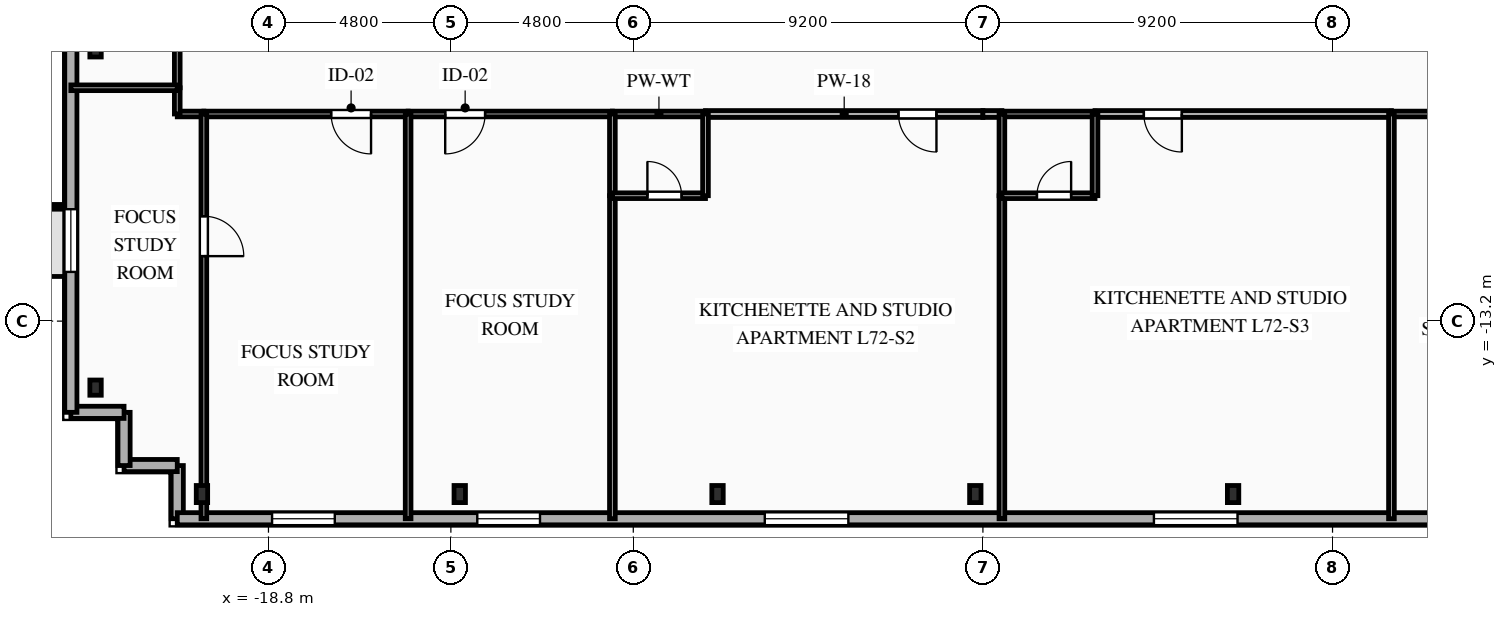
"""IFC4 building model, lengths in metres.
Left out: names, types, materials, properties, quantities, classifications, styles, units other than length and angle.
Written with IfcOpenShell. Run it as: python <this file> out.ifc"""

import sys

from ifc_helpers import new_model, si_unit, direction, frame, frame_2d, origin, origin_2d, place, context, subcontext, project, spatial, rectangle, i_section, extrude, element, fill, save


model = new_model("IFC4")
c1 = context("Model", 3, precision=1e-05, world=origin(), true_north=direction((0.0, 1.0)))
c2 = subcontext(c1, "Body", "Model", "MODEL_VIEW")
j1 = project(units=[si_unit("LENGTHUNIT", "METRE"), si_unit("PLANEANGLEUNIT", "RADIAN")], contexts=[c1])
p1 = place(None, origin())
s1 = spatial("IfcSite", under=j1, at=p1, CompositionType="ELEMENT")
p2 = place(p1, origin())
s2 = spatial("IfcBuilding", under=s1, at=p2, CompositionType="ELEMENT")
p3 = place(p2, frame((0.0, 0.0, 255.1)))
s3 = spatial("IfcBuildingStorey", under=s2, at=p3, CompositionType="ELEMENT", Elevation=255.1)
for number, where, z_axis, x_axis in (
    (1, (-20.55, -17.75, 0.0), (0.0, 0.0, 1.0), (1.0, 0.0, 0.0)),
    (2, (-13.767, -17.75, 0.0), (0.0, 0.0, 1.0), (1.0, 0.0, 0.0)),
    (3, (-6.983, -17.75, 0.0), (0.0, 0.0, 1.0), (1.0, 0.0, 0.0)),
    (4, (-0.2, -17.75, 0.0), (0.0, 0.0, 1.0), (1.0, 0.0, 0.0)),
    (5, (6.583, -17.75, 0.0), (0.0, 0.0, 1.0), (1.0, 0.0, 0.0)),
):
    element("IfcColumn", number, at=place(p3, frame(where, z_axis=z_axis, x_axis=x_axis)), inside=s3, PredefinedType="COLUMN", context=c2, shape_type="SweptSolid", body=[
        extrude(i_section(OverallWidth=0.3, OverallDepth=0.45, WebThickness=0.014, FlangeThickness=0.026, FilletRadius=0.027, at=origin_2d()), origin(), (0.0, 0.0, 1.0), 3.35),
    ])
for number, where, z_axis, x_axis in (
    (6, (-23.35, -6.05, 0.0), (0.0, 0.0, 1.0), (1.0, 0.0, 0.0)),
    (7, (-23.35, -14.95, 0.0), (0.0, 0.0, 1.0), (1.0, 0.0, 0.0)),
):
    element("IfcColumn", number, at=place(p3, frame(where, z_axis=z_axis, x_axis=x_axis)), inside=s3, PredefinedType="COLUMN", context=c2, shape_type="SweptSolid", body=[
        extrude(i_section(OverallWidth=0.3, OverallDepth=0.4, WebThickness=0.013, FlangeThickness=0.024, FilletRadius=0.027, at=origin_2d()), origin(), (0.0, 0.0, 1.0), 3.35),
    ])
p4 = place(p3, frame((-21.2, -18.4, 0.0), z_axis=(0.0, 0.0, 1.0), x_axis=(0.0, 1.0, 0.0)))
e8 = element("IfcWall", 8, at=p4, inside=s3, PredefinedType="SOLIDWALL", context=c2, shape_type="SweptSolid", body=[
    extrude(rectangle(XDim=1.4, YDim=0.32, at=frame_2d((0.7, 0.0))), origin(), (0.0, 0.0, 1.0), 3.04),
])
p5 = place(p3, frame((-21.2, -17.0, 0.0), z_axis=(0.0, 0.0, 1.0), x_axis=(-1.0, 0.0, 0.0)))
e9 = element("IfcWall", 9, at=p5, inside=s3, PredefinedType="SOLIDWALL", context=c2, shape_type="SweptSolid", body=[
    extrude(rectangle(XDim=1.4, YDim=0.32, at=frame_2d((0.7, 0.0))), origin(), (0.0, 0.0, 1.0), 3.04),
])
for number, where, z_axis, x_axis in (
    (10, (-22.6, -17.0, 0.0), (0.0, 0.0, 1.0), (0.0, 1.0, 0.0)),
    (11, (-22.6, -15.6, 0.0), (0.0, 0.0, 1.0), (-1.0, 0.0, 0.0)),
):
    element("IfcWall", number, at=place(p3, frame(where, z_axis=z_axis, x_axis=x_axis)), inside=s3, PredefinedType="SOLIDWALL", context=c2, shape_type="SweptSolid", body=[
        extrude(rectangle(XDim=1.4, YDim=0.32, at=frame_2d((0.7, 0.0))), origin(), (0.0, 0.0, 1.0), 3.04),
    ])
p6 = place(p3, frame((-24.0, -15.6, 0.0), z_axis=(0.0, 0.0, 1.0), x_axis=(0.0, 1.0, 0.0)))
e12 = element("IfcWall", 12, at=p6, inside=s3, PredefinedType="SOLIDWALL", context=c2, shape_type="SweptSolid", body=[
    extrude(rectangle(XDim=28.0, YDim=0.32, at=frame_2d((14.0, 0.0))), origin(), (0.0, 0.0, 1.0), 3.04),
])
p7 = place(p6, frame((3.695, 0.0, 0.85)))
e13 = element("IfcOpeningElement", 13, at=p7, cuts=e12, PredefinedType="OPENING", context=c2, shape_type="SweptSolid", body=[
    extrude(rectangle(XDim=1.65, YDim=1.85, at=frame_2d((0.825, 0.925))), frame((0.0, 0.17, 0.0), z_axis=(0.0, -1.0, 0.0), x_axis=(1.0, 0.0, 0.0)), (0.0, 0.0, 1.0), 0.34),
])
p8 = place(p6, frame((13.215, 0.0, 0.85)))
e14 = element("IfcOpeningElement", 14, at=p8, cuts=e12, PredefinedType="OPENING", context=c2, shape_type="SweptSolid", body=[
    extrude(rectangle(XDim=1.65, YDim=1.85, at=frame_2d((0.825, 0.925))), frame((0.0, 0.17, 0.0), z_axis=(0.0, -1.0, 0.0), x_axis=(1.0, 0.0, 0.0)), (0.0, 0.0, 1.0), 0.34),
])
p9 = place(p6, frame((22.735, 0.0, 0.85)))
e15 = element("IfcOpeningElement", 15, at=p9, cuts=e12, PredefinedType="OPENING", context=c2, shape_type="SweptSolid", body=[
    extrude(rectangle(XDim=1.65, YDim=1.85, at=frame_2d((0.825, 0.925))), frame((0.0, 0.17, 0.0), z_axis=(0.0, -1.0, 0.0), x_axis=(1.0, 0.0, 0.0)), (0.0, 0.0, 1.0), 0.34),
])
p10 = place(p3, frame((20.8, -18.4, 0.0), z_axis=(0.0, 0.0, 1.0), x_axis=(-1.0, 0.0, 0.0)))
e16 = element("IfcWall", 16, at=p10, inside=s3, PredefinedType="SOLIDWALL", context=c2, shape_type="SweptSolid", body=[
    extrude(rectangle(XDim=42.0, YDim=0.32, at=frame_2d((21.0, 0.0))), origin(), (0.0, 0.0, 1.0), 3.04),
])
p11 = place(p10, frame((2.015, 0.0, 0.85)))
e17 = element("IfcOpeningElement", 17, at=p11, cuts=e16, PredefinedType="OPENING", context=c2, shape_type="SweptSolid", body=[
    extrude(rectangle(XDim=1.65, YDim=1.85, at=frame_2d((0.825, 0.925))), frame((0.0, 0.17, 0.0), z_axis=(0.0, -1.0, 0.0), x_axis=(1.0, 0.0, 0.0)), (0.0, 0.0, 1.0), 0.34),
])
p12 = place(p10, frame((6.815, 0.0, 0.85)))
e18 = element("IfcOpeningElement", 18, at=p12, cuts=e16, PredefinedType="OPENING", context=c2, shape_type="SweptSolid", body=[
    extrude(rectangle(XDim=1.65, YDim=1.85, at=frame_2d((0.825, 0.925))), frame((0.0, 0.17, 0.0), z_axis=(0.0, -1.0, 0.0), x_axis=(1.0, 0.0, 0.0)), (0.0, 0.0, 1.0), 0.34),
])
p13 = place(p10, frame((14.1, 0.0, 0.85)))
e19 = element("IfcOpeningElement", 19, at=p13, cuts=e16, PredefinedType="OPENING", context=c2, shape_type="SweptSolid", body=[
    extrude(rectangle(XDim=2.2, YDim=1.85, at=frame_2d((1.1, 0.925))), frame((0.0, 0.17, 0.0), z_axis=(0.0, -1.0, 0.0), x_axis=(1.0, 0.0, 0.0)), (0.0, 0.0, 1.0), 0.34),
])
p14 = place(p10, frame((24.34, 0.0, 0.85)))
e20 = element("IfcOpeningElement", 20, at=p14, cuts=e16, PredefinedType="OPENING", context=c2, shape_type="SweptSolid", body=[
    extrude(rectangle(XDim=2.2, YDim=1.85, at=frame_2d((1.1, 0.925))), frame((0.0, 0.17, 0.0), z_axis=(0.0, -1.0, 0.0), x_axis=(1.0, 0.0, 0.0)), (0.0, 0.0, 1.0), 0.34),
])
p15 = place(p10, frame((32.455, 0.0, 0.85)))
e21 = element("IfcOpeningElement", 21, at=p15, cuts=e16, PredefinedType="OPENING", context=c2, shape_type="SweptSolid", body=[
    extrude(rectangle(XDim=1.65, YDim=1.85, at=frame_2d((0.825, 0.925))), frame((0.0, 0.17, 0.0), z_axis=(0.0, -1.0, 0.0), x_axis=(1.0, 0.0, 0.0)), (0.0, 0.0, 1.0), 0.34),
])
p16 = place(p10, frame((37.855, 0.0, 0.85)))
e22 = element("IfcOpeningElement", 22, at=p16, cuts=e16, PredefinedType="OPENING", context=c2, shape_type="SweptSolid", body=[
    extrude(rectangle(XDim=1.65, YDim=1.85, at=frame_2d((0.825, 0.925))), frame((0.0, 0.17, 0.0), z_axis=(0.0, -1.0, 0.0), x_axis=(1.0, 0.0, 0.0)), (0.0, 0.0, 1.0), 0.34),
])
p17 = place(p3, frame((-20.5, -7.75, 0.0), z_axis=(0.0, 0.0, 1.0), x_axis=(-1.0, 0.0, 0.0)))
e23 = element("IfcWall", 23, at=p17, inside=s3, PredefinedType="PARTITIONING", context=c2, shape_type="SweptSolid", body=[
    extrude(rectangle(XDim=0.7, YDim=0.15, at=frame_2d((0.35, 0.0))), origin(), (0.0, 0.0, 1.0), 3.04),
])
p18 = place(p3, frame((-21.2, -7.75, 0.0), z_axis=(0.0, 0.0, 1.0), x_axis=(0.0, 1.0, 0.0)))
e24 = element("IfcWall", 24, at=p18, inside=s3, PredefinedType="PARTITIONING", context=c2, shape_type="SweptSolid", body=[
    extrude(rectangle(XDim=0.69, YDim=0.15, at=frame_2d((0.345, 0.0))), origin(), (0.0, 0.0, 1.0), 2.695),
])
p19 = place(p3, frame((-21.2, -7.06, 0.0), z_axis=(0.0, 0.0, 1.0), x_axis=(0.0, 1.0, 0.0)))
e25 = element("IfcWall", 25, at=p19, inside=s3, PredefinedType="PARTITIONING", context=c2, shape_type="SweptSolid", body=[
    extrude(rectangle(XDim=1.46, YDim=0.15, at=frame_2d((0.73, 0.0))), origin(), (0.0, 0.0, 1.0), 2.695),
])
p20 = place(p3, frame((-15.125, -7.75, 0.0), z_axis=(0.0, 0.0, 1.0), x_axis=(-1.0, 0.0, 0.0)))
e26 = element("IfcWall", 26, at=p20, inside=s3, PredefinedType="PARTITIONING", context=c2, shape_type="SweptSolid", body=[
    extrude(rectangle(XDim=5.375, YDim=0.15, at=frame_2d((2.688, 0.0))), origin(), (0.0, 0.0, 1.0), 3.04),
])
p21 = place(p20, frame((0.976, 0.0, 0.0)))
e27 = element("IfcOpeningElement", 27, at=p21, cuts=e26, PredefinedType="OPENING", context=c2, shape_type="SweptSolid", body=[
    extrude(rectangle(XDim=1.05, YDim=2.15, at=frame_2d((0.525, 1.075))), frame((0.0, 0.085, 0.0), z_axis=(0.0, -1.0, 0.0), x_axis=(1.0, 0.0, 0.0)), (0.0, 0.0, 1.0), 0.17),
])
p22 = place(p3, frame((-9.75, -7.75, 0.0), z_axis=(0.0, 0.0, 1.0), x_axis=(-1.0, 0.0, 0.0)))
e28 = element("IfcWall", 28, at=p22, inside=s3, PredefinedType="PARTITIONING", context=c2, shape_type="SweptSolid", body=[
    extrude(rectangle(XDim=5.375, YDim=0.15, at=frame_2d((2.688, 0.0))), origin(), (0.0, 0.0, 1.0), 3.04),
])
p23 = place(p22, frame((3.349, 0.0, 0.0)))
e29 = element("IfcOpeningElement", 29, at=p23, cuts=e28, PredefinedType="OPENING", context=c2, shape_type="SweptSolid", body=[
    extrude(rectangle(XDim=1.05, YDim=2.15, at=frame_2d((0.525, 1.075))), frame((0.0, 0.085, 0.0), z_axis=(0.0, -1.0, 0.0), x_axis=(1.0, 0.0, 0.0)), (0.0, 0.0, 1.0), 0.17),
])
p24 = place(p3, frame((0.0, -7.75, 0.0), z_axis=(0.0, 0.0, 1.0), x_axis=(-1.0, 0.0, 0.0)))
e30 = element("IfcWall", 30, at=p24, inside=s3, PredefinedType="PARTITIONING", context=c2, shape_type="SweptSolid", body=[
    extrude(rectangle(XDim=7.3, YDim=0.18, at=frame_2d((3.65, 0.0))), origin(), (0.0, 0.0, 1.0), 3.04),
])
p25 = place(p24, frame((1.222, 0.0, 0.0)))
e31 = element("IfcOpeningElement", 31, at=p25, cuts=e30, PredefinedType="OPENING", context=c2, shape_type="SweptSolid", body=[
    extrude(rectangle(XDim=1.0, YDim=2.15, at=frame_2d((0.5, 1.075))), frame((0.0, 0.1, 0.0), z_axis=(0.0, -1.0, 0.0), x_axis=(1.0, 0.0, 0.0)), (0.0, 0.0, 1.0), 0.2),
])
p26 = place(p3, frame((-7.3, -7.75, 0.0), z_axis=(0.0, 0.0, 1.0), x_axis=(-1.0, 0.0, 0.0)))
e32 = element("IfcWall", 32, at=p26, inside=s3, PredefinedType="PLUMBINGWALL", context=c2, shape_type="SweptSolid", body=[
    extrude(rectangle(XDim=2.45, YDim=0.15, at=frame_2d((1.225, 0.0))), origin(), (0.0, 0.0, 1.0), 3.04),
])
p27 = place(p3, frame((0.5, -7.75, 0.0), z_axis=(0.0, 0.0, 1.0), x_axis=(-1.0, 0.0, 0.0)))
e33 = element("IfcWall", 33, at=p27, inside=s3, PredefinedType="PARTITIONING", context=c2, shape_type="SweptSolid", body=[
    extrude(rectangle(XDim=0.5, YDim=0.18, at=frame_2d((0.25, 0.0))), origin(), (0.0, 0.0, 1.0), 3.04),
])
p28 = place(p3, frame((10.75, -7.75, 0.0), z_axis=(0.0, 0.0, 1.0), x_axis=(-1.0, 0.0, 0.0)))
e34 = element("IfcWall", 34, at=p28, inside=s3, PredefinedType="PARTITIONING", context=c2, shape_type="SweptSolid", body=[
    extrude(rectangle(XDim=7.8, YDim=0.18, at=frame_2d((3.9, 0.0))), origin(), (0.0, 0.0, 1.0), 3.04),
])
p29 = place(p28, frame((5.515, 0.0, 0.0)))
e35 = element("IfcOpeningElement", 35, at=p29, cuts=e34, PredefinedType="OPENING", context=c2, shape_type="SweptSolid", body=[
    extrude(rectangle(XDim=1.0, YDim=2.15, at=frame_2d((0.5, 1.075))), frame((0.0, 0.1, 0.0), z_axis=(0.0, -1.0, 0.0), x_axis=(1.0, 0.0, 0.0)), (0.0, 0.0, 1.0), 0.2),
])
p30 = place(p3, frame((2.95, -7.75, 0.0), z_axis=(0.0, 0.0, 1.0), x_axis=(-1.0, 0.0, 0.0)))
e36 = element("IfcWall", 36, at=p30, inside=s3, PredefinedType="PLUMBINGWALL", context=c2, shape_type="SweptSolid", body=[
    extrude(rectangle(XDim=2.45, YDim=0.15, at=frame_2d((1.225, 0.0))), origin(), (0.0, 0.0, 1.0), 3.04),
])
p31 = place(p3, frame((15.625, -7.75, 0.0), z_axis=(0.0, 0.0, 1.0), x_axis=(-1.0, 0.0, 0.0)))
e37 = element("IfcWall", 37, at=p31, inside=s3, PredefinedType="PARTITIONING", context=c2, shape_type="SweptSolid", body=[
    extrude(rectangle(XDim=4.875, YDim=0.15, at=frame_2d((2.438, 0.0))), origin(), (0.0, 0.0, 1.0), 3.04),
])
p32 = place(p31, frame((1.246, 0.0, 0.0)))
e38 = element("IfcOpeningElement", 38, at=p32, cuts=e37, PredefinedType="OPENING", context=c2, shape_type="SweptSolid", body=[
    extrude(rectangle(XDim=1.05, YDim=2.15, at=frame_2d((0.525, 1.075))), frame((0.0, 0.085, 0.0), z_axis=(0.0, -1.0, 0.0), x_axis=(1.0, 0.0, 0.0)), (0.0, 0.0, 1.0), 0.17),
])
p33 = place(p3, frame((-24.0, -7.06, 0.0), z_axis=(0.0, 0.0, 1.0), x_axis=(1.0, 0.0, 0.0)))
e39 = element("IfcWall", 39, at=p33, inside=s3, PredefinedType="PARTITIONING", context=c2, shape_type="SweptSolid", body=[
    extrude(rectangle(XDim=2.8, YDim=0.15, at=frame_2d((1.4, 0.0))), origin(), (0.0, 0.0, 1.0), 3.04),
])
p34 = place(p3, frame((-20.5, -7.75, 0.0), z_axis=(0.0, 0.0, 1.0), x_axis=(0.0, -1.0, 0.0)))
e40 = element("IfcWall", 40, at=p34, inside=s3, PredefinedType="PARTITIONING", context=c2, shape_type="SweptSolid", body=[
    extrude(rectangle(XDim=10.65, YDim=0.15, at=frame_2d((5.325, 0.0))), origin(), (0.0, 0.0, 1.0), 2.665),
])
p35 = place(p34, frame((2.69, 0.0, 0.0)))
e41 = element("IfcOpeningElement", 41, at=p35, cuts=e40, PredefinedType="OPENING", context=c2, shape_type="SweptSolid", body=[
    extrude(rectangle(XDim=1.05, YDim=2.15, at=frame_2d((0.525, 1.075))), frame((0.0, 0.085, 0.0), z_axis=(0.0, -1.0, 0.0), x_axis=(1.0, 0.0, 0.0)), (0.0, 0.0, 1.0), 0.17),
])
p36 = place(p3, frame((-15.125, -7.75, 0.0), z_axis=(0.0, 0.0, 1.0), x_axis=(0.0, -1.0, 0.0)))
e42 = element("IfcWall", 42, at=p36, inside=s3, PredefinedType="PARTITIONING", context=c2, shape_type="SweptSolid", body=[
    extrude(rectangle(XDim=10.65, YDim=0.15, at=frame_2d((5.325, 0.0))), origin(), (0.0, 0.0, 1.0), 3.04),
])
p37 = place(p3, frame((-9.75, -9.9, 0.0), z_axis=(0.0, 0.0, 1.0), x_axis=(0.0, -1.0, 0.0)))
e43 = element("IfcWall", 43, at=p37, inside=s3, PredefinedType="PARTITIONING", context=c2, shape_type="SweptSolid", body=[
    extrude(rectangle(XDim=8.5, YDim=0.15, at=frame_2d((4.25, 0.0))), origin(), (0.0, 0.0, 1.0), 3.04),
])
p38 = place(p3, frame((-9.75, -7.75, 0.0), z_axis=(0.0, 0.0, 1.0), x_axis=(0.0, -1.0, 0.0)))
e44 = element("IfcWall", 44, at=p38, inside=s3, PredefinedType="PLUMBINGWALL", context=c2, shape_type="SweptSolid", body=[
    extrude(rectangle(XDim=2.15, YDim=0.15, at=frame_2d((1.075, 0.0))), origin(), (0.0, 0.0, 1.0), 3.04),
])
p39 = place(p3, frame((-9.75, -9.9, 0.0), z_axis=(0.0, 0.0, 1.0), x_axis=(1.0, 0.0, 0.0)))
e45 = element("IfcWall", 45, at=p39, inside=s3, PredefinedType="PLUMBINGWALL", context=c2, shape_type="SweptSolid", body=[
    extrude(rectangle(XDim=2.45, YDim=0.15, at=frame_2d((1.225, 0.0))), origin(), (0.0, 0.0, 1.0), 3.04),
])
p40 = place(p39, frame((0.921, 0.0, 0.0)))
e46 = element("IfcOpeningElement", 46, at=p40, cuts=e45, PredefinedType="OPENING", context=c2, shape_type="SweptSolid", body=[
    extrude(rectangle(XDim=0.9, YDim=2.1, at=frame_2d((0.45, 1.05))), frame((0.0, 0.085, 0.0), z_axis=(0.0, -1.0, 0.0), x_axis=(1.0, 0.0, 0.0)), (0.0, 0.0, 1.0), 0.17),
])
p41 = place(p3, frame((-7.3, -9.9, 0.0), z_axis=(0.0, 0.0, 1.0), x_axis=(0.0, 1.0, 0.0)))
e47 = element("IfcWall", 47, at=p41, inside=s3, PredefinedType="PLUMBINGWALL", context=c2, shape_type="SweptSolid", body=[
    extrude(rectangle(XDim=2.15, YDim=0.15, at=frame_2d((1.075, 0.0))), origin(), (0.0, 0.0, 1.0), 3.04),
])
p42 = place(p3, frame((0.5, -9.9, 0.0), z_axis=(0.0, 0.0, 1.0), x_axis=(0.0, -1.0, 0.0)))
e48 = element("IfcWall", 48, at=p42, inside=s3, PredefinedType="PARTITIONING", context=c2, shape_type="SweptSolid", body=[
    extrude(rectangle(XDim=8.5, YDim=0.15, at=frame_2d((4.25, 0.0))), origin(), (0.0, 0.0, 1.0), 3.04),
])
p43 = place(p3, frame((0.5, -7.75, 0.0), z_axis=(0.0, 0.0, 1.0), x_axis=(0.0, -1.0, 0.0)))
e49 = element("IfcWall", 49, at=p43, inside=s3, PredefinedType="PLUMBINGWALL", context=c2, shape_type="SweptSolid", body=[
    extrude(rectangle(XDim=2.15, YDim=0.15, at=frame_2d((1.075, 0.0))), origin(), (0.0, 0.0, 1.0), 3.04),
])
p44 = place(p3, frame((0.5, -9.9, 0.0), z_axis=(0.0, 0.0, 1.0), x_axis=(1.0, 0.0, 0.0)))
e50 = element("IfcWall", 50, at=p44, inside=s3, PredefinedType="PLUMBINGWALL", context=c2, shape_type="SweptSolid", body=[
    extrude(rectangle(XDim=2.45, YDim=0.15, at=frame_2d((1.225, 0.0))), origin(), (0.0, 0.0, 1.0), 3.04),
])
p45 = place(p44, frame((0.921, 0.0, 0.0)))
e51 = element("IfcOpeningElement", 51, at=p45, cuts=e50, PredefinedType="OPENING", context=c2, shape_type="SweptSolid", body=[
    extrude(rectangle(XDim=0.9, YDim=2.1, at=frame_2d((0.45, 1.05))), frame((0.0, 0.085, 0.0), z_axis=(0.0, -1.0, 0.0), x_axis=(1.0, 0.0, 0.0)), (0.0, 0.0, 1.0), 0.17),
])
p46 = place(p3, frame((2.95, -9.9, 0.0), z_axis=(0.0, 0.0, 1.0), x_axis=(0.0, 1.0, 0.0)))
e52 = element("IfcWall", 52, at=p46, inside=s3, PredefinedType="PLUMBINGWALL", context=c2, shape_type="SweptSolid", body=[
    extrude(rectangle(XDim=2.15, YDim=0.15, at=frame_2d((1.075, 0.0))), origin(), (0.0, 0.0, 1.0), 3.04),
])
p47 = place(p3, frame((10.75, -7.75, 0.0), z_axis=(0.0, 0.0, 1.0), x_axis=(0.0, -1.0, 0.0)))
e53 = element("IfcWall", 53, at=p47, inside=s3, PredefinedType="PARTITIONING", context=c2, shape_type="SweptSolid", body=[
    extrude(rectangle(XDim=10.65, YDim=0.15, at=frame_2d((5.325, 0.0))), origin(), (0.0, 0.0, 1.0), 3.04),
])
p48 = place(p7, origin())
e54 = element("IfcWindow", 54, at=p48, inside=s3, PartitioningType="SINGLE_PANEL", PredefinedType="WINDOW", context=c2, shape_type="SweptSolid", body=[
    extrude(rectangle(XDim=1.65, YDim=1.85, at=frame_2d((0.825, 0.925))), frame((0.0, 0.03, 0.0), z_axis=(0.0, -1.0, 0.0), x_axis=(1.0, 0.0, 0.0)), (0.0, 0.0, 1.0), 0.06),
])
fill(e13, e54)
p49 = place(p13, origin())
e55 = element("IfcWindow", 55, at=p49, inside=s3, PartitioningType="SINGLE_PANEL", PredefinedType="WINDOW", context=c2, shape_type="SweptSolid", body=[
    extrude(rectangle(XDim=2.2, YDim=1.85, at=frame_2d((1.1, 0.925))), frame((0.0, 0.03, 0.0), z_axis=(0.0, -1.0, 0.0), x_axis=(1.0, 0.0, 0.0)), (0.0, 0.0, 1.0), 0.06),
])
fill(e19, e55)
p50 = place(p14, origin())
e56 = element("IfcWindow", 56, at=p50, inside=s3, PartitioningType="SINGLE_PANEL", PredefinedType="WINDOW", context=c2, shape_type="SweptSolid", body=[
    extrude(rectangle(XDim=2.2, YDim=1.85, at=frame_2d((1.1, 0.925))), frame((0.0, 0.03, 0.0), z_axis=(0.0, -1.0, 0.0), x_axis=(1.0, 0.0, 0.0)), (0.0, 0.0, 1.0), 0.06),
])
fill(e20, e56)
p51 = place(p15, origin())
e57 = element("IfcWindow", 57, at=p51, inside=s3, PartitioningType="SINGLE_PANEL", PredefinedType="WINDOW", context=c2, shape_type="SweptSolid", body=[
    extrude(rectangle(XDim=1.65, YDim=1.85, at=frame_2d((0.825, 0.925))), frame((0.0, 0.03, 0.0), z_axis=(0.0, -1.0, 0.0), x_axis=(1.0, 0.0, 0.0)), (0.0, 0.0, 1.0), 0.06),
])
fill(e21, e57)
p52 = place(p16, origin())
e58 = element("IfcWindow", 58, at=p52, inside=s3, PartitioningType="SINGLE_PANEL", PredefinedType="WINDOW", context=c2, shape_type="SweptSolid", body=[
    extrude(rectangle(XDim=1.65, YDim=1.85, at=frame_2d((0.825, 0.925))), frame((0.0, 0.03, 0.0), z_axis=(0.0, -1.0, 0.0), x_axis=(1.0, 0.0, 0.0)), (0.0, 0.0, 1.0), 0.06),
])
fill(e22, e58)
p53 = place(p21, origin())
e59 = element("IfcDoor", 59, at=p53, inside=s3, OperationType="SINGLE_SWING_LEFT", PredefinedType="DOOR", context=c2, shape_type="SweptSolid", body=[
    extrude(rectangle(XDim=1.05, YDim=2.15, at=frame_2d((0.525, 1.075))), frame((0.0, 0.025, 0.0), z_axis=(0.0, -1.0, 0.0), x_axis=(1.0, 0.0, 0.0)), (0.0, 0.0, 1.0), 0.05),
])
fill(e27, e59)
p54 = place(p23, origin())
e60 = element("IfcDoor", 60, at=p54, inside=s3, OperationType="SINGLE_SWING_RIGHT", PredefinedType="DOOR", context=c2, shape_type="SweptSolid", body=[
    extrude(rectangle(XDim=1.05, YDim=2.15, at=frame_2d((0.525, 1.075))), frame((0.0, 0.025, 0.0), z_axis=(0.0, -1.0, 0.0), x_axis=(1.0, 0.0, 0.0)), (0.0, 0.0, 1.0), 0.05),
])
fill(e29, e60)
p55 = place(p25, origin())
e61 = element("IfcDoor", 61, at=p55, inside=s3, OperationType="SINGLE_SWING_LEFT", PredefinedType="DOOR", context=c2, shape_type="SweptSolid", body=[
    extrude(rectangle(XDim=1.0, YDim=2.15, at=frame_2d((0.5, 1.075))), frame((0.0, 0.025, 0.0), z_axis=(0.0, -1.0, 0.0), x_axis=(1.0, 0.0, 0.0)), (0.0, 0.0, 1.0), 0.05),
])
fill(e31, e61)
p56 = place(p29, origin())
e62 = element("IfcDoor", 62, at=p56, inside=s3, OperationType="SINGLE_SWING_LEFT", PredefinedType="DOOR", context=c2, shape_type="SweptSolid", body=[
    extrude(rectangle(XDim=1.0, YDim=2.15, at=frame_2d((0.5, 1.075))), frame((0.0, 0.025, 0.0), z_axis=(0.0, -1.0, 0.0), x_axis=(1.0, 0.0, 0.0)), (0.0, 0.0, 1.0), 0.05),
])
fill(e35, e62)
p57 = place(p35, origin())
e63 = element("IfcDoor", 63, at=p57, inside=s3, OperationType="SINGLE_SWING_RIGHT", PredefinedType="DOOR", context=c2, shape_type="SweptSolid", body=[
    extrude(rectangle(XDim=1.05, YDim=2.15, at=frame_2d((0.525, 1.075))), frame((0.0, 0.025, 0.0), z_axis=(0.0, -1.0, 0.0), x_axis=(1.0, 0.0, 0.0)), (0.0, 0.0, 1.0), 0.05),
])
fill(e41, e63)
p58 = place(p40, origin())
e64 = element("IfcDoor", 64, at=p58, inside=s3, OperationType="SINGLE_SWING_LEFT", PredefinedType="DOOR", context=c2, shape_type="SweptSolid", body=[
    extrude(rectangle(XDim=0.9, YDim=2.1, at=frame_2d((0.45, 1.05))), frame((0.0, 0.025, 0.0), z_axis=(0.0, -1.0, 0.0), x_axis=(1.0, 0.0, 0.0)), (0.0, 0.0, 1.0), 0.05),
])
fill(e46, e64)
p59 = place(p45, origin())
e65 = element("IfcDoor", 65, at=p59, inside=s3, OperationType="SINGLE_SWING_RIGHT", PredefinedType="DOOR", context=c2, shape_type="SweptSolid", body=[
    extrude(rectangle(XDim=0.9, YDim=2.1, at=frame_2d((0.45, 1.05))), frame((0.0, 0.025, 0.0), z_axis=(0.0, -1.0, 0.0), x_axis=(1.0, 0.0, 0.0)), (0.0, 0.0, 1.0), 0.05),
])
fill(e51, e65)
save(model, sys.argv[1])
